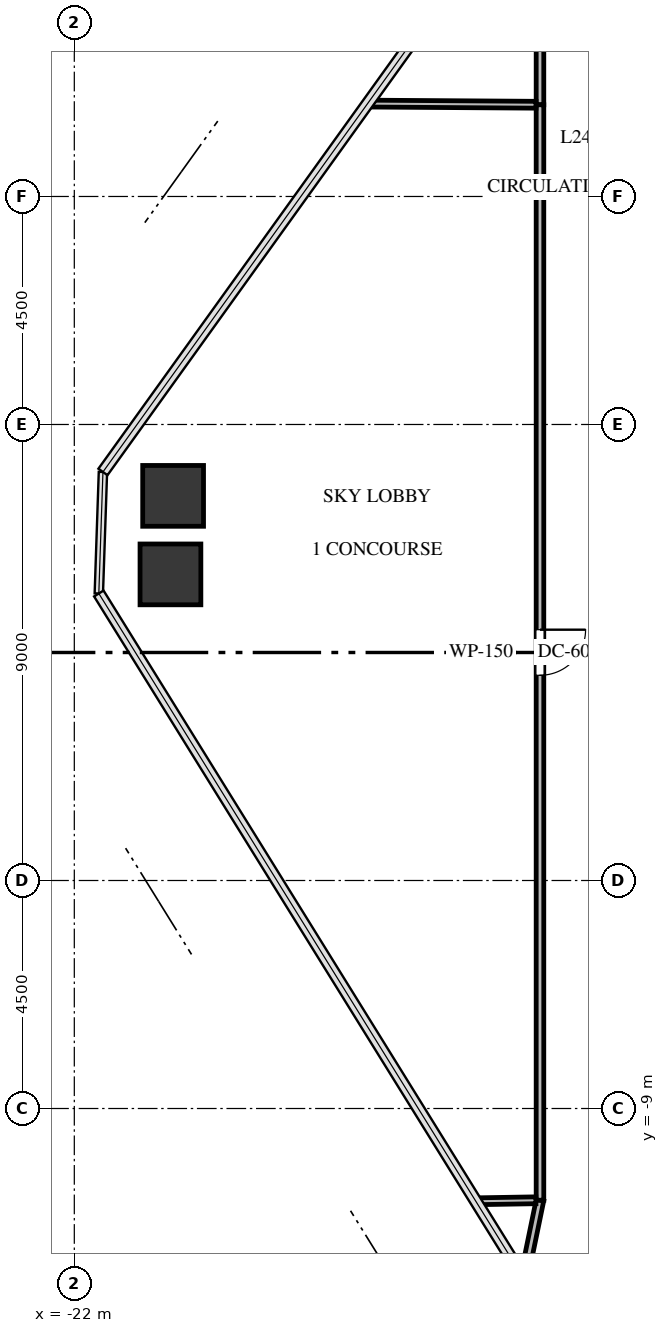
"""IFC4 building model, lengths in metres.
Left out: names, types, materials, properties, quantities, classifications, styles, units other than length and angle.
Written with IfcOpenShell. Run it as: python <this file> out.ifc"""

import sys

from ifc_helpers import new_model, si_unit, direction, frame, frame_2d, origin, origin_2d, place, context, subcontext, project, spatial, rectangle, extrude, source, transform, mapped, element, fill, save


model = new_model("IFC4")
c1 = context("Model", 3, precision=1e-05, world=origin(), true_north=direction((0.0, 1.0)))
c2 = subcontext(c1, "Body", "Model", "MODEL_VIEW")
j1 = project(units=[si_unit("LENGTHUNIT", "METRE"), si_unit("PLANEANGLEUNIT", "RADIAN")], contexts=[c1])
p1 = place(None, origin())
s1 = spatial("IfcSite", under=j1, at=p1, CompositionType="ELEMENT")
p2 = place(p1, origin())
s2 = spatial("IfcBuilding", under=s1, at=p2, CompositionType="ELEMENT")
p3 = place(p2, frame((0.0, 0.0, 93.3)))
s3 = spatial("IfcBuildingStorey", under=s2, at=p3, CompositionType="ELEMENT", Elevation=93.3)
m1 = source(origin(), c2, "Body", "SweptSolid", [
    extrude(rectangle(XDim=1.2, YDim=1.2, at=origin_2d()), origin(), (0.0, 0.0, 1.0), 4.26),
])
for number, where, z_axis, x_axis in (
    (1, (-20.103, 1.542, -0.3), (0.0, 0.0, 1.0), (1.0, 0.0, 0.0)),
    (2, (-20.05, 3.091, -0.3), (0.0, 0.0, 1.0), (1.0, 0.0, 0.0)),
):
    element("IfcColumn", number, at=place(p3, frame(where, z_axis=z_axis, x_axis=x_axis)), inside=s3, PredefinedType="COLUMN", context=c2, shape_type="MappedRepresentation", body=[
        mapped(m1, transform((0.0, 0.0, 0.0), x_axis=(1.0, 0.0, 0.0), y_axis=(0.0, 1.0, 0.0), z_axis=(0.0, 0.0, 1.0), scale=1.0)),
    ])
p4 = place(p3, frame((-12.81, 12.081, 0.0), z_axis=(0.0, 0.0, 1.0), x_axis=(0.0, -1.0, 0.0)))
e3 = element("IfcWall", 3, at=p4, inside=s3, PredefinedType="PARTITIONING", context=c2, shape_type="SweptSolid", body=[
    extrude(rectangle(XDim=1.271, YDim=0.15, at=frame_2d((0.635, 0.0))), origin(), (0.0, 0.0, 1.0), 3.945),
])
p5 = place(p3, frame((-12.81, -10.81, 0.0), z_axis=(0.0, 0.0, 1.0), x_axis=(-0.201786289638, -0.979429575474, 0.0)))
e4 = element("IfcWall", 4, at=p5, inside=s3, PredefinedType="PARTITIONING", context=c2, shape_type="SweptSolid", body=[
    extrude(rectangle(XDim=1.498, YDim=0.15, at=frame_2d((0.749, 0.0))), origin(), (0.0, 0.0, 1.0), 3.945),
])
p6 = place(p3, frame((-12.81, 10.81, 0.0), z_axis=(0.0, 0.0, 1.0), x_axis=(0.0, -1.0, 0.0)))
e5 = element("IfcWall", 5, at=p6, inside=s3, PredefinedType="PARTITIONING", context=c2, shape_type="SweptSolid", body=[
    extrude(rectangle(XDim=21.62, YDim=0.15, at=frame_2d((10.81, 0.0))), origin(), (0.0, 0.0, 1.0), 3.112),
])
p7 = place(p6, frame((10.36, 0.0, 0.0)))
e6 = element("IfcOpeningElement", 6, at=p7, cuts=e5, PredefinedType="OPENING", context=c2, shape_type="SweptSolid", body=[
    extrude(rectangle(XDim=0.9, YDim=2.05, at=frame_2d((0.45, 1.025))), frame((0.0, 0.085, 0.0), z_axis=(0.0, -1.0, 0.0), x_axis=(1.0, 0.0, 0.0)), (0.0, 0.0, 1.0), 0.17),
])
p8 = place(p3, frame((-12.889, 10.811, 0.0), z_axis=(0.0, 0.0, 1.0), x_axis=(-0.999976657862, 0.006832549348, 0.0)))
e7 = element("IfcWall", 7, at=p8, inside=s3, PredefinedType="PARTITIONING", context=c2, shape_type="SweptSolid", body=[
    extrude(rectangle(XDim=3.323, YDim=0.135, at=frame_2d((1.662, 0.0))), origin(), (0.0, 0.0, 1.0), 3.28),
])
p9 = place(p3, frame((-14.076, -10.831, 0.0), z_axis=(0.0, 0.0, 1.0), x_axis=(0.999860796611, 0.016684945308, 0.0)))
e8 = element("IfcWall", 8, at=p9, inside=s3, PredefinedType="PARTITIONING", context=c2, shape_type="SweptSolid", body=[
    extrude(rectangle(XDim=1.185, YDim=0.135, at=frame_2d((0.593, 0.0))), origin(), (0.0, 0.0, 1.0), 3.945),
])
m2 = source(origin(), c2, "Body", "SweptSolid", [
    extrude(rectangle(XDim=0.9, YDim=2.05, at=frame_2d((0.45, 1.025))), frame((0.0, 0.025, 0.0), z_axis=(0.0, -1.0, 0.0), x_axis=(1.0, 0.0, 0.0)), (0.0, 0.0, 1.0), 0.05),
])
p10 = place(p7, origin())
e9 = element("IfcDoor", 9, at=p10, inside=s3, OperationType="SINGLE_SWING_LEFT", PredefinedType="DOOR", context=c2, shape_type="MappedRepresentation", body=[
    mapped(m2, transform((0.0, 0.0, 0.0), x_axis=(1.0, 0.0, 0.0), y_axis=(0.0, 1.0, 0.0), z_axis=(0.0, 0.0, 1.0), scale=1.0)),
])
fill(e6, e9)
save(model, sys.argv[1])
